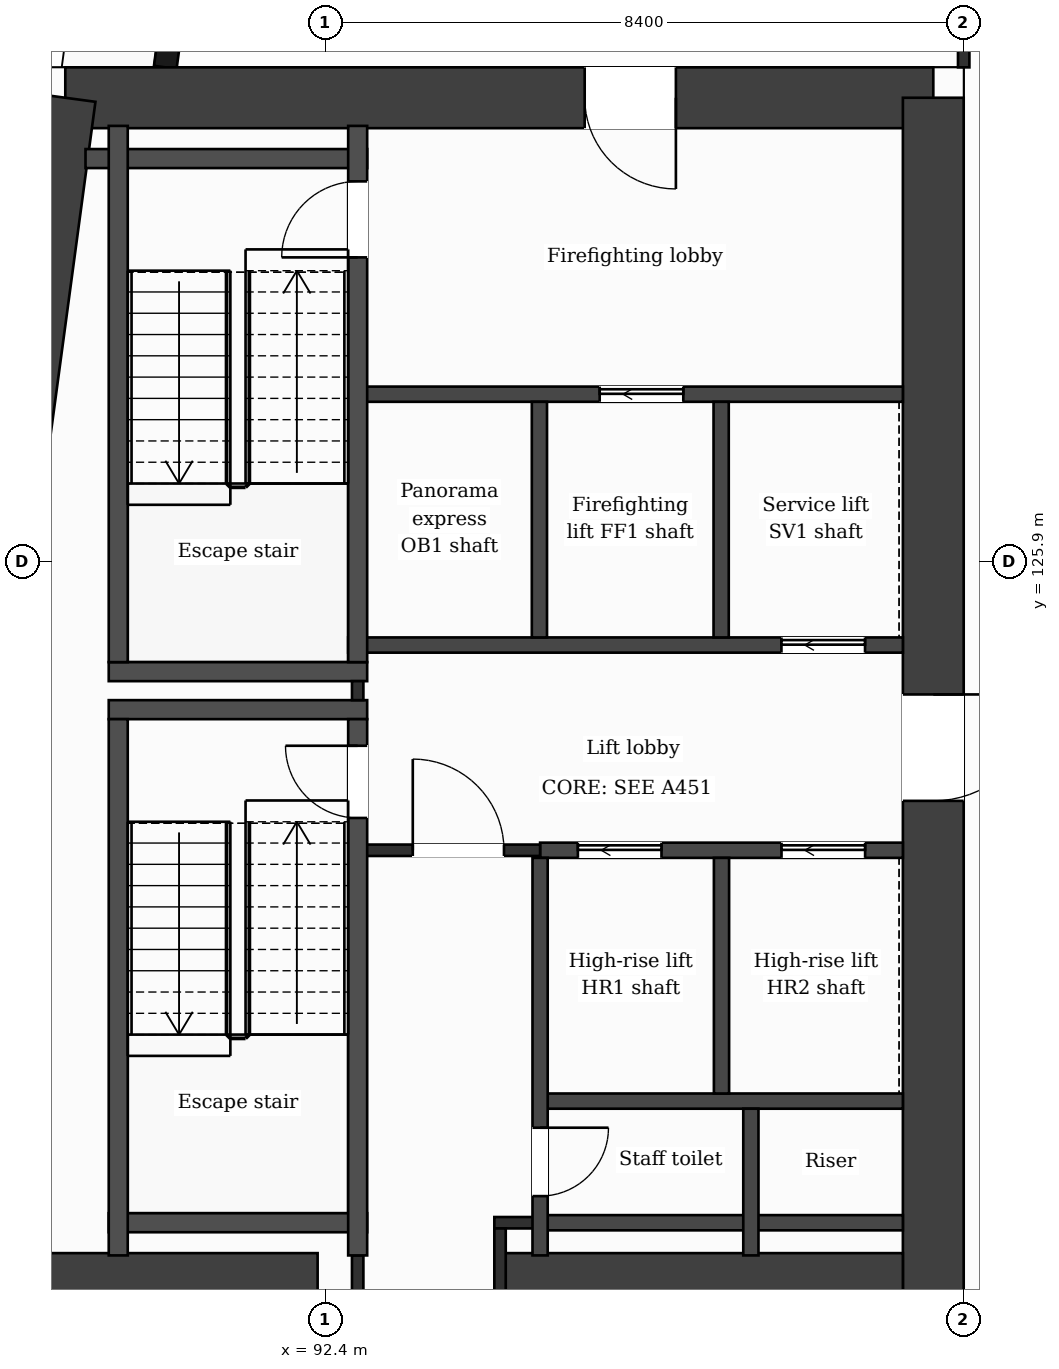
"""IFC4 building model, lengths in metres.
Left out: names, types, materials, properties, quantities, classifications, styles, units other than length and angle.
Written with IfcOpenShell. Run it as: python <this file> out.ifc"""

import sys

from ifc_helpers import new_model, si_unit, direction, frame, frame_2d, origin, place, context, subcontext, project, spatial, rectangle, extrude, element, fill, save


model = new_model("IFC4")
c1 = context("Model", 3, precision=1e-05, world=origin(), true_north=direction((0.0, 1.0)))
c2 = subcontext(c1, "Body", "Model", "MODEL_VIEW")
j1 = project(units=[si_unit("LENGTHUNIT", "METRE"), si_unit("PLANEANGLEUNIT", "RADIAN")], contexts=[c1])
p1 = place(None, origin())
s1 = spatial("IfcSite", under=j1, at=p1, CompositionType="ELEMENT")
p2 = place(p1, origin())
s2 = spatial("IfcBuilding", under=s1, at=p2, CompositionType="ELEMENT")
p3 = place(p2, frame((0.0, 0.0, 209.6)))
s3 = spatial("IfcBuildingStorey", under=s2, at=p3, CompositionType="ELEMENT", Elevation=209.6)
p4 = place(p3, frame((88.98, 132.0, 0.0), z_axis=(0.0, 0.0, 1.0), x_axis=(1.0, 0.0, 0.0)))
e1 = element("IfcWall", 1, at=p4, inside=s3, PredefinedType="SHEAR", context=c2, shape_type="SweptSolid", body=[
    extrude(rectangle(XDim=11.419, YDim=0.8, at=frame_2d((5.71, 0.0))), origin(), (0.0, 0.0, 1.0), 3.7),
])
p5 = place(p4, frame((6.833, 0.0, 0.0)))
e2 = element("IfcOpeningElement", 2, at=p5, cuts=e1, PredefinedType="OPENING", context=c2, shape_type="SweptSolid", body=[
    extrude(rectangle(XDim=1.2, YDim=2.1, at=frame_2d((0.6, 1.05))), frame((0.0, 0.41, 0.0), z_axis=(0.0, -1.0, 0.0), x_axis=(1.0, 0.0, 0.0)), (0.0, 0.0, 1.0), 0.82),
])
p6 = place(p3, frame((100.4, 132.0, 0.0), z_axis=(0.0, 0.0, 1.0), x_axis=(0.0, -1.0, 0.0)))
e3 = element("IfcWall", 3, at=p6, inside=s3, PredefinedType="SHEAR", context=c2, shape_type="SweptSolid", body=[
    extrude(rectangle(XDim=21.2, YDim=0.8, at=frame_2d((10.6, 0.0))), origin(), (0.0, 0.0, 1.0), 3.7),
])
p7 = place(p6, frame((7.85, 0.0, 0.0)))
e4 = element("IfcOpeningElement", 4, at=p7, cuts=e3, PredefinedType="OPENING", context=c2, shape_type="SweptSolid", body=[
    extrude(rectangle(XDim=1.4, YDim=2.1, at=frame_2d((0.7, 1.05))), frame((0.0, 0.41, 0.0), z_axis=(0.0, -1.0, 0.0), x_axis=(1.0, 0.0, 0.0)), (0.0, 0.0, 1.0), 0.82),
])
p8 = place(p3, frame((86.127, 110.8, 0.0), z_axis=(0.0, 0.0, 1.0), x_axis=(0.133408347329, 0.991061154956, 0.0)))
e5 = element("IfcWall", 5, at=p8, inside=s3, PredefinedType="SHEAR", context=c2, shape_type="SweptSolid", body=[
    extrude(rectangle(XDim=21.391, YDim=0.8, at=frame_2d((10.696, 0.0))), origin(), (0.0, 0.0, 1.0), 3.7),
])
p9 = place(p3, frame((87.223, 116.4, 0.0), z_axis=(0.0, 0.0, 1.0), x_axis=(1.0, 0.0, 0.0)))
e6 = element("IfcWall", 6, at=p9, inside=s3, PredefinedType="SHEAR", context=c2, shape_type="SweptSolid", body=[
    extrude(rectangle(XDim=5.077, YDim=0.8, at=frame_2d((2.539, 0.0))), origin(), (0.0, 0.0, 1.0), 3.7),
])
p10 = place(p3, frame((94.7, 116.4, 0.0), z_axis=(0.0, 0.0, 1.0), x_axis=(1.0, 0.0, 0.0)))
e7 = element("IfcWall", 7, at=p10, inside=s3, PredefinedType="SHEAR", context=c2, shape_type="SweptSolid", body=[
    extrude(rectangle(XDim=5.3, YDim=0.8, at=frame_2d((2.65, 0.0))), origin(), (0.0, 0.0, 1.0), 3.7),
])
p11 = place(p3, frame((91.177, 138.95, 0.0), z_axis=(0.0, 0.0, 1.0), x_axis=(-0.133426664613, -0.991058689065, 0.0)))
e8 = element("IfcWall", 8, at=p11, inside=s3, PredefinedType="SOLIDWALL", context=c2, shape_type="SweptSolid", body=[
    extrude(rectangle(XDim=6.609, YDim=0.3, at=frame_2d((3.305, 0.0))), origin(), (0.0, 0.0, 1.0), 3.38),
])
p12 = place(p11, frame((1.039, 0.0, 0.9)))
e9 = element("IfcOpeningElement", 9, at=p12, cuts=e8, PredefinedType="OPENING", context=c2, shape_type="SweptSolid", body=[
    extrude(rectangle(XDim=1.2, YDim=2.1, at=frame_2d((0.6, 1.05))), frame((0.0, 0.16, 0.0), z_axis=(0.0, -1.0, 0.0), x_axis=(1.0, 0.0, 0.0)), (0.0, 0.0, 1.0), 0.32),
])
p13 = place(p11, frame((4.294, 0.0, 0.0)))
e10 = element("IfcOpeningElement", 10, at=p13, cuts=e8, PredefinedType="OPENING", context=c2, shape_type="SweptSolid", body=[
    extrude(rectangle(XDim=1.2, YDim=2.4, at=frame_2d((0.6, 1.2))), frame((0.0, 0.16, 0.0), z_axis=(0.0, -1.0, 0.0), x_axis=(1.0, 0.0, 0.0)), (0.0, 0.0, 1.0), 0.32),
])
p14 = place(p3, frame((95.227, 117.2, 0.0), z_axis=(0.0, 0.0, 1.0), x_axis=(1.0, 0.0, 0.0)))
e11 = element("IfcWall", 11, at=p14, inside=s3, PredefinedType="PARTITIONING", context=c2, shape_type="SweptSolid", body=[
    extrude(rectangle(XDim=4.773, YDim=0.2, at=frame_2d((2.386, 0.0))), origin(), (0.0, 0.0, 1.0), 3.38),
])
p15 = place(p3, frame((94.625, 117.2, 0.0), z_axis=(0.0, 0.0, 1.0), x_axis=(1.0, 0.0, 0.0)))
e12 = element("IfcWall", 12, at=p15, inside=s3, PredefinedType="PARTITIONING", context=c2, shape_type="SweptSolid", body=[
    extrude(rectangle(XDim=0.602, YDim=0.15, at=frame_2d((0.301, 0.0))), origin(), (0.0, 0.0, 1.0), 3.38),
])
p16 = place(p3, frame((89.552, 117.2, 0.0), z_axis=(0.0, 0.0, 1.0), x_axis=(1.0, 0.0, 0.0)))
e13 = element("IfcWall", 13, at=p16, inside=s3, PredefinedType="PARTITIONING", context=c2, shape_type="SweptSolid", body=[
    extrude(rectangle(XDim=3.4, YDim=0.25, at=frame_2d((1.7, 0.0))), origin(), (0.0, 0.0, 1.0), 3.38),
])
p17 = place(p3, frame((95.227, 118.8, 0.0), z_axis=(0.0, 0.0, 1.0), x_axis=(1.0, 0.0, 0.0)))
e14 = element("IfcWall", 14, at=p17, inside=s3, PredefinedType="PARTITIONING", context=c2, shape_type="SweptSolid", body=[
    extrude(rectangle(XDim=4.773, YDim=0.2, at=frame_2d((2.386, 0.0))), origin(), (0.0, 0.0, 1.0), 3.38),
])
p18 = place(p3, frame((95.227, 122.1, 0.0), z_axis=(0.0, 0.0, 1.0), x_axis=(1.0, 0.0, 0.0)))
e15 = element("IfcWall", 15, at=p18, inside=s3, PredefinedType="PARTITIONING", context=c2, shape_type="SweptSolid", body=[
    extrude(rectangle(XDim=4.773, YDim=0.2, at=frame_2d((2.386, 0.0))), origin(), (0.0, 0.0, 1.0), 3.38),
])
p19 = place(p18, frame((0.497, 0.0, 0.0)))
e16 = element("IfcOpeningElement", 16, at=p19, cuts=e15, PredefinedType="OPENING", context=c2, shape_type="SweptSolid", body=[
    extrude(rectangle(XDim=1.1, YDim=2.1, at=frame_2d((0.55, 1.05))), frame((0.0, 0.11, 0.0), z_axis=(0.0, -1.0, 0.0), x_axis=(1.0, 0.0, 0.0)), (0.0, 0.0, 1.0), 0.22),
])
p20 = place(p18, frame((3.176, 0.0, 0.0)))
e17 = element("IfcOpeningElement", 17, at=p20, cuts=e15, PredefinedType="OPENING", context=c2, shape_type="SweptSolid", body=[
    extrude(rectangle(XDim=1.1, YDim=2.1, at=frame_2d((0.55, 1.05))), frame((0.0, 0.11, 0.0), z_axis=(0.0, -1.0, 0.0), x_axis=(1.0, 0.0, 0.0)), (0.0, 0.0, 1.0), 0.22),
])
p21 = place(p3, frame((92.827, 122.1, 0.0), z_axis=(0.0, 0.0, 1.0), x_axis=(1.0, 0.0, 0.0)))
e18 = element("IfcWall", 18, at=p21, inside=s3, PredefinedType="PARTITIONING", context=c2, shape_type="SweptSolid", body=[
    extrude(rectangle(XDim=2.4, YDim=0.15, at=frame_2d((1.2, 0.0))), origin(), (0.0, 0.0, 1.0), 3.38),
])
p22 = place(p21, frame((0.725, 0.0, 0.0)))
e19 = element("IfcOpeningElement", 19, at=p22, cuts=e18, PredefinedType="OPENING", context=c2, shape_type="SweptSolid", body=[
    extrude(rectangle(XDim=1.2, YDim=2.1, at=frame_2d((0.6, 1.05))), frame((0.0, 0.085, 0.0), z_axis=(0.0, -1.0, 0.0), x_axis=(1.0, 0.0, 0.0)), (0.0, 0.0, 1.0), 0.17),
])
for number, where, z_axis, x_axis in (
    (20, (89.552, 123.95, 0.0), (0.0, 0.0, 1.0), (1.0, 0.0, 0.0)),
    (21, (89.552, 124.45, 0.0), (0.0, 0.0, 1.0), (1.0, 0.0, 0.0)),
):
    element("IfcWall", number, at=place(p3, frame(where, z_axis=z_axis, x_axis=x_axis)), inside=s3, PredefinedType="PARTITIONING", context=c2, shape_type="SweptSolid", body=[
        extrude(rectangle(XDim=3.4, YDim=0.25, at=frame_2d((1.7, 0.0))), origin(), (0.0, 0.0, 1.0), 3.38),
    ])
p23 = place(p3, frame((92.702, 124.8, 0.0), z_axis=(0.0, 0.0, 1.0), x_axis=(1.0, 0.0, 0.0)))
e22 = element("IfcWall", 22, at=p23, inside=s3, PredefinedType="PARTITIONING", context=c2, shape_type="SweptSolid", body=[
    extrude(rectangle(XDim=7.298, YDim=0.2, at=frame_2d((3.649, 0.0))), origin(), (0.0, 0.0, 1.0), 3.38),
])
p24 = place(p23, frame((5.7, 0.0, 0.0)))
e23 = element("IfcOpeningElement", 23, at=p24, cuts=e22, PredefinedType="OPENING", context=c2, shape_type="SweptSolid", body=[
    extrude(rectangle(XDim=1.1, YDim=2.1, at=frame_2d((0.55, 1.05))), frame((0.0, 0.11, 0.0), z_axis=(0.0, -1.0, 0.0), x_axis=(1.0, 0.0, 0.0)), (0.0, 0.0, 1.0), 0.22),
])
p25 = place(p3, frame((92.827, 128.1, 0.0), z_axis=(0.0, 0.0, 1.0), x_axis=(1.0, 0.0, 0.0)))
e24 = element("IfcWall", 24, at=p25, inside=s3, PredefinedType="PARTITIONING", context=c2, shape_type="SweptSolid", body=[
    extrude(rectangle(XDim=7.173, YDim=0.2, at=frame_2d((3.586, 0.0))), origin(), (0.0, 0.0, 1.0), 3.38),
])
p26 = place(p25, frame((3.184, 0.0, 0.0)))
e25 = element("IfcOpeningElement", 25, at=p26, cuts=e24, PredefinedType="OPENING", context=c2, shape_type="SweptSolid", body=[
    extrude(rectangle(XDim=1.1, YDim=2.1, at=frame_2d((0.55, 1.05))), frame((0.0, 0.11, 0.0), z_axis=(0.0, -1.0, 0.0), x_axis=(1.0, 0.0, 0.0)), (0.0, 0.0, 1.0), 0.22),
])
p27 = place(p3, frame((89.246, 131.2, 0.0), z_axis=(0.0, 0.0, 1.0), x_axis=(1.0, 0.0, 0.0)))
e26 = element("IfcWall", 26, at=p27, inside=s3, PredefinedType="PARTITIONING", context=c2, shape_type="SweptSolid", body=[
    extrude(rectangle(XDim=3.706, YDim=0.25, at=frame_2d((1.853, 0.0))), origin(), (0.0, 0.0, 1.0), 3.38),
])
for number, where, z_axis, x_axis in (
    (27, (89.677, 116.77, 0.0), (0.0, 0.0, 1.0), (0.0, 1.0, 0.0)),
    (28, (89.677, 124.575, 0.0), (0.0, 0.0, 1.0), (0.0, 1.0, 0.0)),
):
    element("IfcWall", number, at=place(p3, frame(where, z_axis=z_axis, x_axis=x_axis)), inside=s3, PredefinedType="PARTITIONING", context=c2, shape_type="SweptSolid", body=[
        extrude(rectangle(XDim=7.055, YDim=0.25, at=frame_2d((3.527, 0.0))), origin(), (0.0, 0.0, 1.0), 3.38),
    ])
p28 = place(p3, frame((92.827, 116.0, 0.0), z_axis=(0.0, 0.0, 1.0), x_axis=(0.0, 1.0, 0.0)))
e29 = element("IfcWall", 29, at=p28, inside=s3, PredefinedType="PARTITIONING", context=c2, shape_type="SweptSolid", body=[
    extrude(rectangle(XDim=0.77, YDim=0.15, at=frame_2d((0.385, 0.0))), origin(), (0.0, 0.0, 1.0), 3.38),
])
p29 = place(p3, frame((92.827, 124.075, 0.0), z_axis=(0.0, 0.0, 1.0), x_axis=(0.0, 1.0, 0.0)))
e30 = element("IfcWall", 30, at=p29, inside=s3, PredefinedType="PARTITIONING", context=c2, shape_type="SweptSolid", body=[
    extrude(rectangle(XDim=0.25, YDim=0.15, at=frame_2d((0.125, 0.0))), origin(), (0.0, 0.0, 1.0), 3.38),
])
p30 = place(p3, frame((92.827, 116.77, 0.0), z_axis=(0.0, 0.0, 1.0), x_axis=(0.0, 1.0, 0.0)))
e31 = element("IfcWall", 31, at=p30, inside=s3, PredefinedType="PARTITIONING", context=c2, shape_type="SweptSolid", body=[
    extrude(rectangle(XDim=7.055, YDim=0.25, at=frame_2d((3.527, 0.0))), origin(), (0.0, 0.0, 1.0), 3.38),
])
p31 = place(p30, frame((5.755, 0.0, 0.0)))
e32 = element("IfcOpeningElement", 32, at=p31, cuts=e31, PredefinedType="OPENING", context=c2, shape_type="SweptSolid", body=[
    extrude(rectangle(XDim=0.95, YDim=2.1, at=frame_2d((0.475, 1.05))), frame((0.0, 0.135, 0.0), z_axis=(0.0, -1.0, 0.0), x_axis=(1.0, 0.0, 0.0)), (0.0, 0.0, 1.0), 0.27),
])
p32 = place(p3, frame((92.827, 124.575, 0.0), z_axis=(0.0, 0.0, 1.0), x_axis=(0.0, 1.0, 0.0)))
e33 = element("IfcWall", 33, at=p32, inside=s3, PredefinedType="PARTITIONING", context=c2, shape_type="SweptSolid", body=[
    extrude(rectangle(XDim=7.055, YDim=0.25, at=frame_2d((3.527, 0.0))), origin(), (0.0, 0.0, 1.0), 3.38),
])
p33 = place(p32, frame((5.325, 0.0, 0.0)))
e34 = element("IfcOpeningElement", 34, at=p33, cuts=e33, PredefinedType="OPENING", context=c2, shape_type="SweptSolid", body=[
    extrude(rectangle(XDim=1.0, YDim=2.1, at=frame_2d((0.5, 1.05))), frame((0.0, 0.135, 0.0), z_axis=(0.0, -1.0, 0.0), x_axis=(1.0, 0.0, 0.0)), (0.0, 0.0, 1.0), 0.27),
])
p34 = place(p3, frame((94.7, 116.0, 0.0), z_axis=(0.0, 0.0, 1.0), x_axis=(0.0, 1.0, 0.0)))
e35 = element("IfcWall", 35, at=p34, inside=s3, PredefinedType="PARTITIONING", context=c2, shape_type="SweptSolid", body=[
    extrude(rectangle(XDim=1.125, YDim=0.15, at=frame_2d((0.562, 0.0))), origin(), (0.0, 0.0, 1.0), 3.38),
])
p35 = place(p3, frame((95.218, 124.9, 0.0), z_axis=(0.0, 0.0, 1.0), x_axis=(0.0, 1.0, 0.0)))
e36 = element("IfcWall", 36, at=p35, inside=s3, PredefinedType="PARTITIONING", context=c2, shape_type="SweptSolid", body=[
    extrude(rectangle(XDim=3.1, YDim=0.2, at=frame_2d((1.55, 0.0))), origin(), (0.0, 0.0, 1.0), 3.38),
])
p36 = place(p3, frame((95.227, 116.77, 0.0), z_axis=(0.0, 0.0, 1.0), x_axis=(0.0, 1.0, 0.0)))
e37 = element("IfcWall", 37, at=p36, inside=s3, PredefinedType="PARTITIONING", context=c2, shape_type="SweptSolid", body=[
    extrude(rectangle(XDim=5.23, YDim=0.2, at=frame_2d((2.615, 0.0))), origin(), (0.0, 0.0, 1.0), 3.38),
])
p37 = place(p36, frame((0.78, 0.0, 0.0)))
e38 = element("IfcOpeningElement", 38, at=p37, cuts=e37, PredefinedType="OPENING", context=c2, shape_type="SweptSolid", body=[
    extrude(rectangle(XDim=0.9, YDim=2.1, at=frame_2d((0.45, 1.05))), frame((0.0, 0.11, 0.0), z_axis=(0.0, -1.0, 0.0), x_axis=(1.0, 0.0, 0.0)), (0.0, 0.0, 1.0), 0.22),
])
for number, where, z_axis, x_axis in (
    (39, (97.609, 124.9, 0.0), (0.0, 0.0, 1.0), (0.0, 1.0, 0.0)),
    (40, (97.614, 118.9, 0.0), (0.0, 0.0, 1.0), (0.0, 1.0, 0.0)),
):
    element("IfcWall", number, at=place(p3, frame(where, z_axis=z_axis, x_axis=x_axis)), inside=s3, PredefinedType="PARTITIONING", context=c2, shape_type="SweptSolid", body=[
        extrude(rectangle(XDim=3.1, YDim=0.2, at=frame_2d((1.55, 0.0))), origin(), (0.0, 0.0, 1.0), 3.38),
    ])
p38 = place(p3, frame((98.0, 116.77, 0.0), z_axis=(0.0, 0.0, 1.0), x_axis=(0.0, 1.0, 0.0)))
e41 = element("IfcWall", 41, at=p38, inside=s3, PredefinedType="PARTITIONING", context=c2, shape_type="SweptSolid", body=[
    extrude(rectangle(XDim=1.93, YDim=0.2, at=frame_2d((0.965, 0.0))), origin(), (0.0, 0.0, 1.0), 3.38),
])
p39 = place(p3, frame((100.8, 132.4, 0.0), z_axis=(0.0, 0.0, 1.0), x_axis=(0.0, 1.0, 0.0)))
e42 = element("IfcWall", 42, at=p39, inside=s3, PredefinedType="PARTITIONING", context=c2, shape_type="SweptSolid", body=[
    extrude(rectangle(XDim=1.325, YDim=0.15, at=frame_2d((0.663, 0.0))), origin(), (0.0, 0.0, 1.0), 3.38),
])
p40 = place(p22, origin())
e43 = element("IfcDoor", 43, at=p40, inside=s3, OperationType="SINGLE_SWING_LEFT", PredefinedType="DOOR", context=c2, shape_type="SweptSolid", body=[
    extrude(rectangle(XDim=1.2, YDim=2.1, at=frame_2d((0.6, 1.05))), frame((0.0, 0.025, 0.0), z_axis=(0.0, -1.0, 0.0), x_axis=(1.0, 0.0, 0.0)), (0.0, 0.0, 1.0), 0.05),
])
fill(e19, e43)
p41 = place(p19, origin())
e44 = element("IfcDoor", 44, at=p41, inside=s3, OperationType="SLIDING_TO_LEFT", PredefinedType="DOOR", context=c2, shape_type="SweptSolid", body=[
    extrude(rectangle(XDim=1.1, YDim=2.1, at=frame_2d((0.55, 1.05))), frame((0.0, 0.025, 0.0), z_axis=(0.0, -1.0, 0.0), x_axis=(1.0, 0.0, 0.0)), (0.0, 0.0, 1.0), 0.05),
])
fill(e16, e44)
p42 = place(p20, origin())
e45 = element("IfcDoor", 45, at=p42, inside=s3, OperationType="SLIDING_TO_LEFT", PredefinedType="DOOR", context=c2, shape_type="SweptSolid", body=[
    extrude(rectangle(XDim=1.1, YDim=2.1, at=frame_2d((0.55, 1.05))), frame((0.0, 0.025, 0.0), z_axis=(0.0, -1.0, 0.0), x_axis=(1.0, 0.0, 0.0)), (0.0, 0.0, 1.0), 0.05),
])
fill(e17, e45)
p43 = place(p26, origin())
e46 = element("IfcDoor", 46, at=p43, inside=s3, OperationType="SLIDING_TO_LEFT", PredefinedType="DOOR", context=c2, shape_type="SweptSolid", body=[
    extrude(rectangle(XDim=1.1, YDim=2.1, at=frame_2d((0.55, 1.05))), frame((0.0, 0.025, 0.0), z_axis=(0.0, -1.0, 0.0), x_axis=(1.0, 0.0, 0.0)), (0.0, 0.0, 1.0), 0.05),
])
fill(e25, e46)
p44 = place(p24, origin())
e47 = element("IfcDoor", 47, at=p44, inside=s3, OperationType="SLIDING_TO_LEFT", PredefinedType="DOOR", context=c2, shape_type="SweptSolid", body=[
    extrude(rectangle(XDim=1.1, YDim=2.1, at=frame_2d((0.55, 1.05))), frame((0.0, 0.025, 0.0), z_axis=(0.0, -1.0, 0.0), x_axis=(1.0, 0.0, 0.0)), (0.0, 0.0, 1.0), 0.05),
])
fill(e23, e47)
p45 = place(p31, origin())
e48 = element("IfcDoor", 48, at=p45, inside=s3, OperationType="SINGLE_SWING_RIGHT", PredefinedType="DOOR", context=c2, shape_type="SweptSolid", body=[
    extrude(rectangle(XDim=0.95, YDim=2.1, at=frame_2d((0.475, 1.05))), frame((0.0, 0.025, 0.0), z_axis=(0.0, -1.0, 0.0), x_axis=(1.0, 0.0, 0.0)), (0.0, 0.0, 1.0), 0.05),
])
fill(e32, e48)
p46 = place(p33, origin())
e49 = element("IfcDoor", 49, at=p46, inside=s3, OperationType="SINGLE_SWING_LEFT", PredefinedType="DOOR", context=c2, shape_type="SweptSolid", body=[
    extrude(rectangle(XDim=1.0, YDim=2.1, at=frame_2d((0.5, 1.05))), frame((0.0, 0.025, 0.0), z_axis=(0.0, -1.0, 0.0), x_axis=(1.0, 0.0, 0.0)), (0.0, 0.0, 1.0), 0.05),
])
fill(e34, e49)
p47 = place(p37, origin())
e50 = element("IfcDoor", 50, at=p47, inside=s3, OperationType="SINGLE_SWING_RIGHT", PredefinedType="DOOR", context=c2, shape_type="SweptSolid", body=[
    extrude(rectangle(XDim=0.9, YDim=2.1, at=frame_2d((0.45, 1.05))), frame((0.0, 0.025, 0.0), z_axis=(0.0, -1.0, 0.0), x_axis=(1.0, 0.0, 0.0)), (0.0, 0.0, 1.0), 0.05),
])
fill(e38, e50)
p48 = place(p5, origin())
e51 = element("IfcDoor", 51, at=p48, inside=s3, OperationType="SINGLE_SWING_RIGHT", PredefinedType="DOOR", context=c2, shape_type="SweptSolid", body=[
    extrude(rectangle(XDim=1.2, YDim=2.1, at=frame_2d((0.6, 1.05))), frame((0.0, 0.025, 0.0), z_axis=(0.0, -1.0, 0.0), x_axis=(1.0, 0.0, 0.0)), (0.0, 0.0, 1.0), 0.05),
])
fill(e2, e51)
p49 = place(p7, origin())
e52 = element("IfcDoor", 52, at=p49, inside=s3, OperationType="SINGLE_SWING_LEFT", PredefinedType="DOOR", context=c2, shape_type="SweptSolid", body=[
    extrude(rectangle(XDim=1.4, YDim=2.1, at=frame_2d((0.7, 1.05))), frame((0.0, 0.025, 0.0), z_axis=(0.0, -1.0, 0.0), x_axis=(1.0, 0.0, 0.0)), (0.0, 0.0, 1.0), 0.05),
])
fill(e4, e52)
save(model, sys.argv[1])
